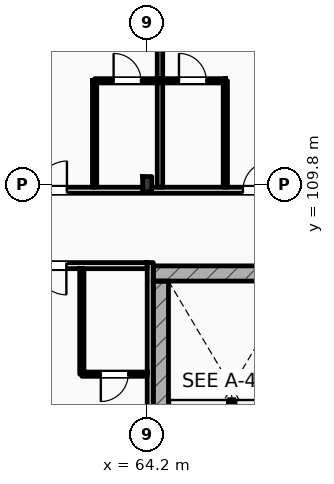
"""IFC4 building model, lengths in metres.
Left out: names, types, materials, properties, quantities, classifications, styles, units other than length and angle.
Written with IfcOpenShell. Run it as: python <this file> out.ifc"""

import sys

from ifc_helpers import new_model, si_unit, direction, frame, frame_2d, origin, origin_2d, place, context, subcontext, project, spatial, rectangle, i_section, extrude, element, fill, save


model = new_model("IFC4")
c1 = context("Model", 3, precision=1e-05, world=origin(), true_north=direction((0.0, 1.0)))
c2 = subcontext(c1, "Body", "Model", "MODEL_VIEW")
j1 = project(units=[si_unit("LENGTHUNIT", "METRE"), si_unit("PLANEANGLEUNIT", "RADIAN")], contexts=[c1])
p1 = place(None, origin())
s1 = spatial("IfcSite", under=j1, at=p1, CompositionType="ELEMENT")
p2 = place(p1, origin())
s2 = spatial("IfcBuilding", under=s1, at=p2, CompositionType="ELEMENT")
p3 = place(p2, frame((0.0, 0.0, 31.8)))
s3 = spatial("IfcBuildingStorey", under=s2, at=p3, CompositionType="ELEMENT", Elevation=31.8)
p4 = place(p3, frame((64.2, 109.8, 0.0), z_axis=(0.0, 0.0, 1.0), x_axis=(1.0, 0.0, 0.0)))
e1 = element("IfcColumn", 1, at=p4, inside=s3, PredefinedType="COLUMN", context=c2, shape_type="SweptSolid", body=[
    extrude(i_section(OverallWidth=0.3, OverallDepth=0.5, WebThickness=0.014, FlangeThickness=0.028, FilletRadius=0.027, at=origin_2d()), origin(), (0.0, 0.0, 1.0), 3.6),
])
p5 = place(p3, frame((64.4, 106.862, 0.0), z_axis=(0.0, 0.0, 1.0), x_axis=(1.0, 0.0, 0.0)))
e2 = element("IfcWall", 2, at=p5, inside=s3, PredefinedType="SHEAR", context=c2, shape_type="SweptSolid", body=[
    extrude(rectangle(XDim=5.16, YDim=0.5, at=frame_2d((2.58, 0.0))), origin(), (0.0, 0.0, 1.0), 3.6),
])
p6 = place(p3, frame((64.65, 97.5, 0.0), z_axis=(0.0, 0.0, 1.0), x_axis=(0.0, 1.0, 0.0)))
e3 = element("IfcWall", 3, at=p6, inside=s3, PredefinedType="SHEAR", context=c2, shape_type="SweptSolid", body=[
    extrude(rectangle(XDim=9.112, YDim=0.5, at=frame_2d((4.556, 0.0))), origin(), (0.0, 0.0, 1.0), 3.6),
])
p7 = place(p3, frame((10.65, 109.6, 0.0), z_axis=(0.0, 0.0, 1.0), x_axis=(1.0, 0.0, 0.0)))
e4 = element("IfcWall", 4, at=p7, inside=s3, PredefinedType="PARTITIONING", context=c2, shape_type="SweptSolid", body=[
    extrude(rectangle(XDim=109.21, YDim=0.2, at=frame_2d((54.605, 0.0))), origin(), (0.0, 0.0, 1.0), 2.72),
])
p8 = place(p7, frame((15.825, 0.0, 0.0)))
e5 = element("IfcOpeningElement", 5, at=p8, cuts=e4, PredefinedType="OPENING", context=c2, shape_type="SweptSolid", body=[
    extrude(rectangle(XDim=1.02, YDim=2.2, at=frame_2d((0.51, 1.1))), frame((0.0, 0.11, 0.0), z_axis=(0.0, -1.0, 0.0), x_axis=(1.0, 0.0, 0.0)), (0.0, 0.0, 1.0), 0.22),
])
p9 = place(p7, frame((19.87, 0.0, 0.0)))
e6 = element("IfcOpeningElement", 6, at=p9, cuts=e4, PredefinedType="OPENING", context=c2, shape_type="SweptSolid", body=[
    extrude(rectangle(XDim=1.02, YDim=2.2, at=frame_2d((0.51, 1.1))), frame((0.0, 0.11, 0.0), z_axis=(0.0, -1.0, 0.0), x_axis=(1.0, 0.0, 0.0)), (0.0, 0.0, 1.0), 0.22),
])
p10 = place(p7, frame((24.47, 0.0, 0.0)))
e7 = element("IfcOpeningElement", 7, at=p10, cuts=e4, PredefinedType="OPENING", context=c2, shape_type="SweptSolid", body=[
    extrude(rectangle(XDim=1.02, YDim=2.2, at=frame_2d((0.51, 1.1))), frame((0.0, 0.11, 0.0), z_axis=(0.0, -1.0, 0.0), x_axis=(1.0, 0.0, 0.0)), (0.0, 0.0, 1.0), 0.22),
])
p11 = place(p7, frame((26.92, 0.0, 0.0)))
e8 = element("IfcOpeningElement", 8, at=p11, cuts=e4, PredefinedType="OPENING", context=c2, shape_type="SweptSolid", body=[
    extrude(rectangle(XDim=1.02, YDim=2.2, at=frame_2d((0.51, 1.1))), frame((0.0, 0.11, 0.0), z_axis=(0.0, -1.0, 0.0), x_axis=(1.0, 0.0, 0.0)), (0.0, 0.0, 1.0), 0.22),
])
p12 = place(p7, frame((33.7, 0.0, 0.0)))
e9 = element("IfcOpeningElement", 9, at=p12, cuts=e4, PredefinedType="OPENING", context=c2, shape_type="SweptSolid", body=[
    extrude(rectangle(XDim=0.96, YDim=2.2, at=frame_2d((0.48, 1.1))), frame((0.0, 0.11, 0.0), z_axis=(0.0, -1.0, 0.0), x_axis=(1.0, 0.0, 0.0)), (0.0, 0.0, 1.0), 0.22),
])
p13 = place(p7, frame((35.9, 0.0, 0.0)))
e10 = element("IfcOpeningElement", 10, at=p13, cuts=e4, PredefinedType="OPENING", context=c2, shape_type="SweptSolid", body=[
    extrude(rectangle(XDim=0.96, YDim=2.2, at=frame_2d((0.48, 1.1))), frame((0.0, 0.11, 0.0), z_axis=(0.0, -1.0, 0.0), x_axis=(1.0, 0.0, 0.0)), (0.0, 0.0, 1.0), 0.22),
])
p14 = place(p7, frame((42.9, 0.0, 0.0)))
e11 = element("IfcOpeningElement", 11, at=p14, cuts=e4, PredefinedType="OPENING", context=c2, shape_type="SweptSolid", body=[
    extrude(rectangle(XDim=0.96, YDim=2.2, at=frame_2d((0.48, 1.1))), frame((0.0, 0.11, 0.0), z_axis=(0.0, -1.0, 0.0), x_axis=(1.0, 0.0, 0.0)), (0.0, 0.0, 1.0), 0.22),
])
p15 = place(p7, frame((47.5, 0.0, 0.0)))
e12 = element("IfcOpeningElement", 12, at=p15, cuts=e4, PredefinedType="OPENING", context=c2, shape_type="SweptSolid", body=[
    extrude(rectangle(XDim=0.96, YDim=2.2, at=frame_2d((0.48, 1.1))), frame((0.0, 0.11, 0.0), z_axis=(0.0, -1.0, 0.0), x_axis=(1.0, 0.0, 0.0)), (0.0, 0.0, 1.0), 0.22),
])
p16 = place(p7, frame((49.95, 0.0, 0.0)))
e13 = element("IfcOpeningElement", 13, at=p16, cuts=e4, PredefinedType="OPENING", context=c2, shape_type="SweptSolid", body=[
    extrude(rectangle(XDim=0.96, YDim=2.2, at=frame_2d((0.48, 1.1))), frame((0.0, 0.11, 0.0), z_axis=(0.0, -1.0, 0.0), x_axis=(1.0, 0.0, 0.0)), (0.0, 0.0, 1.0), 0.22),
])
p17 = place(p7, frame((56.7, 0.0, 0.0)))
e14 = element("IfcOpeningElement", 14, at=p17, cuts=e4, PredefinedType="OPENING", context=c2, shape_type="SweptSolid", body=[
    extrude(rectangle(XDim=0.96, YDim=2.2, at=frame_2d((0.48, 1.1))), frame((0.0, 0.11, 0.0), z_axis=(0.0, -1.0, 0.0), x_axis=(1.0, 0.0, 0.0)), (0.0, 0.0, 1.0), 0.22),
])
p18 = place(p7, frame((59.15, 0.0, 0.0)))
e15 = element("IfcOpeningElement", 15, at=p18, cuts=e4, PredefinedType="OPENING", context=c2, shape_type="SweptSolid", body=[
    extrude(rectangle(XDim=0.96, YDim=2.2, at=frame_2d((0.48, 1.1))), frame((0.0, 0.11, 0.0), z_axis=(0.0, -1.0, 0.0), x_axis=(1.0, 0.0, 0.0)), (0.0, 0.0, 1.0), 0.22),
])
p19 = place(p7, frame((65.9, 0.0, 0.0)))
e16 = element("IfcOpeningElement", 16, at=p19, cuts=e4, PredefinedType="OPENING", context=c2, shape_type="SweptSolid", body=[
    extrude(rectangle(XDim=0.96, YDim=2.2, at=frame_2d((0.48, 1.1))), frame((0.0, 0.11, 0.0), z_axis=(0.0, -1.0, 0.0), x_axis=(1.0, 0.0, 0.0)), (0.0, 0.0, 1.0), 0.22),
])
p20 = place(p7, frame((70.5, 0.0, 0.0)))
e17 = element("IfcOpeningElement", 17, at=p20, cuts=e4, PredefinedType="OPENING", context=c2, shape_type="SweptSolid", body=[
    extrude(rectangle(XDim=0.96, YDim=2.2, at=frame_2d((0.48, 1.1))), frame((0.0, 0.11, 0.0), z_axis=(0.0, -1.0, 0.0), x_axis=(1.0, 0.0, 0.0)), (0.0, 0.0, 1.0), 0.22),
])
p21 = place(p7, frame((72.95, 0.0, 0.0)))
e18 = element("IfcOpeningElement", 18, at=p21, cuts=e4, PredefinedType="OPENING", context=c2, shape_type="SweptSolid", body=[
    extrude(rectangle(XDim=0.96, YDim=2.2, at=frame_2d((0.48, 1.1))), frame((0.0, 0.11, 0.0), z_axis=(0.0, -1.0, 0.0), x_axis=(1.0, 0.0, 0.0)), (0.0, 0.0, 1.0), 0.22),
])
p22 = place(p7, frame((79.7, 0.0, 0.0)))
e19 = element("IfcOpeningElement", 19, at=p22, cuts=e4, PredefinedType="OPENING", context=c2, shape_type="SweptSolid", body=[
    extrude(rectangle(XDim=0.96, YDim=2.2, at=frame_2d((0.48, 1.1))), frame((0.0, 0.11, 0.0), z_axis=(0.0, -1.0, 0.0), x_axis=(1.0, 0.0, 0.0)), (0.0, 0.0, 1.0), 0.22),
])
p23 = place(p7, frame((82.15, 0.0, 0.0)))
e20 = element("IfcOpeningElement", 20, at=p23, cuts=e4, PredefinedType="OPENING", context=c2, shape_type="SweptSolid", body=[
    extrude(rectangle(XDim=0.96, YDim=2.2, at=frame_2d((0.48, 1.1))), frame((0.0, 0.11, 0.0), z_axis=(0.0, -1.0, 0.0), x_axis=(1.0, 0.0, 0.0)), (0.0, 0.0, 1.0), 0.22),
])
p24 = place(p7, frame((88.9, 0.0, 0.0)))
e21 = element("IfcOpeningElement", 21, at=p24, cuts=e4, PredefinedType="OPENING", context=c2, shape_type="SweptSolid", body=[
    extrude(rectangle(XDim=0.96, YDim=2.2, at=frame_2d((0.48, 1.1))), frame((0.0, 0.11, 0.0), z_axis=(0.0, -1.0, 0.0), x_axis=(1.0, 0.0, 0.0)), (0.0, 0.0, 1.0), 0.22),
])
p25 = place(p7, frame((93.75, 0.0, 0.0)))
e22 = element("IfcOpeningElement", 22, at=p25, cuts=e4, PredefinedType="OPENING", context=c2, shape_type="SweptSolid", body=[
    extrude(rectangle(XDim=0.96, YDim=2.2, at=frame_2d((0.48, 1.1))), frame((0.0, 0.11, 0.0), z_axis=(0.0, -1.0, 0.0), x_axis=(1.0, 0.0, 0.0)), (0.0, 0.0, 1.0), 0.22),
])
p26 = place(p7, frame((98.1, 0.0, 0.0)))
e23 = element("IfcOpeningElement", 23, at=p26, cuts=e4, PredefinedType="OPENING", context=c2, shape_type="SweptSolid", body=[
    extrude(rectangle(XDim=0.96, YDim=2.2, at=frame_2d((0.48, 1.1))), frame((0.0, 0.11, 0.0), z_axis=(0.0, -1.0, 0.0), x_axis=(1.0, 0.0, 0.0)), (0.0, 0.0, 1.0), 0.22),
])
p27 = place(p7, frame((102.7, 0.0, 0.0)))
e24 = element("IfcOpeningElement", 24, at=p27, cuts=e4, PredefinedType="OPENING", context=c2, shape_type="SweptSolid", body=[
    extrude(rectangle(XDim=0.96, YDim=2.2, at=frame_2d((0.48, 1.1))), frame((0.0, 0.11, 0.0), z_axis=(0.0, -1.0, 0.0), x_axis=(1.0, 0.0, 0.0)), (0.0, 0.0, 1.0), 0.22),
])
p28 = place(p7, frame((105.04, 0.0, 0.0)))
e25 = element("IfcOpeningElement", 25, at=p28, cuts=e4, PredefinedType="OPENING", context=c2, shape_type="SweptSolid", body=[
    extrude(rectangle(XDim=0.96, YDim=2.2, at=frame_2d((0.48, 1.1))), frame((0.0, 0.11, 0.0), z_axis=(0.0, -1.0, 0.0), x_axis=(1.0, 0.0, 0.0)), (0.0, 0.0, 1.0), 0.22),
])
p29 = place(p7, frame((2.716, 0.0, 0.0)))
e26 = element("IfcOpeningElement", 26, at=p29, cuts=e4, PredefinedType="OPENING", context=c2, shape_type="SweptSolid", body=[
    extrude(rectangle(XDim=1.35, YDim=2.25, at=frame_2d((0.675, 1.125))), frame((0.0, 0.11, 0.0), z_axis=(0.0, -1.0, 0.0), x_axis=(1.0, 0.0, 0.0)), (0.0, 0.0, 1.0), 0.22),
])
p30 = place(p7, frame((6.65, 0.0, 0.0)))
e27 = element("IfcOpeningElement", 27, at=p30, cuts=e4, PredefinedType="OPENING", context=c2, shape_type="SweptSolid", body=[
    extrude(rectangle(XDim=1.35, YDim=2.25, at=frame_2d((0.675, 1.125))), frame((0.0, 0.11, 0.0), z_axis=(0.0, -1.0, 0.0), x_axis=(1.0, 0.0, 0.0)), (0.0, 0.0, 1.0), 0.22),
])
p31 = place(p7, frame((10.583, 0.0, 0.0)))
e28 = element("IfcOpeningElement", 28, at=p31, cuts=e4, PredefinedType="OPENING", context=c2, shape_type="SweptSolid", body=[
    extrude(rectangle(XDim=1.35, YDim=2.25, at=frame_2d((0.675, 1.125))), frame((0.0, 0.11, 0.0), z_axis=(0.0, -1.0, 0.0), x_axis=(1.0, 0.0, 0.0)), (0.0, 0.0, 1.0), 0.22),
])
p32 = place(p3, frame((40.76, 107.12, 0.0), z_axis=(0.0, 0.0, 1.0), x_axis=(1.0, 0.0, 0.0)))
e29 = element("IfcWall", 29, at=p32, inside=s3, PredefinedType="PARTITIONING", context=c2, shape_type="SweptSolid", body=[
    extrude(rectangle(XDim=23.44, YDim=0.2, at=frame_2d((11.72, 0.0))), origin(), (0.0, 0.0, 1.0), 3.36),
])
p33 = place(p32, frame((2.429, 0.0, 0.0)))
e30 = element("IfcOpeningElement", 30, at=p33, cuts=e29, PredefinedType="OPENING", context=c2, shape_type="SweptSolid", body=[
    extrude(rectangle(XDim=0.96, YDim=2.2, at=frame_2d((0.48, 1.1))), frame((0.0, 0.11, 0.0), z_axis=(0.0, -1.0, 0.0), x_axis=(1.0, 0.0, 0.0)), (0.0, 0.0, 1.0), 0.22),
])
p34 = place(p32, frame((4.243, 0.0, 0.0)))
e31 = element("IfcOpeningElement", 31, at=p34, cuts=e29, PredefinedType="OPENING", context=c2, shape_type="SweptSolid", body=[
    extrude(rectangle(XDim=0.96, YDim=2.2, at=frame_2d((0.48, 1.1))), frame((0.0, 0.11, 0.0), z_axis=(0.0, -1.0, 0.0), x_axis=(1.0, 0.0, 0.0)), (0.0, 0.0, 1.0), 0.22),
])
p35 = place(p32, frame((10.301, 0.0, 0.0)))
e32 = element("IfcOpeningElement", 32, at=p35, cuts=e29, PredefinedType="OPENING", context=c2, shape_type="SweptSolid", body=[
    extrude(rectangle(XDim=0.96, YDim=2.2, at=frame_2d((0.48, 1.1))), frame((0.0, 0.11, 0.0), z_axis=(0.0, -1.0, 0.0), x_axis=(1.0, 0.0, 0.0)), (0.0, 0.0, 1.0), 0.22),
])
p36 = place(p32, frame((12.059, 0.0, 0.0)))
e33 = element("IfcOpeningElement", 33, at=p36, cuts=e29, PredefinedType="OPENING", context=c2, shape_type="SweptSolid", body=[
    extrude(rectangle(XDim=0.96, YDim=2.2, at=frame_2d((0.48, 1.1))), frame((0.0, 0.11, 0.0), z_axis=(0.0, -1.0, 0.0), x_axis=(1.0, 0.0, 0.0)), (0.0, 0.0, 1.0), 0.22),
])
p37 = place(p32, frame((18.118, 0.0, 0.0)))
e34 = element("IfcOpeningElement", 34, at=p37, cuts=e29, PredefinedType="OPENING", context=c2, shape_type="SweptSolid", body=[
    extrude(rectangle(XDim=0.96, YDim=2.2, at=frame_2d((0.48, 1.1))), frame((0.0, 0.11, 0.0), z_axis=(0.0, -1.0, 0.0), x_axis=(1.0, 0.0, 0.0)), (0.0, 0.0, 1.0), 0.22),
])
p38 = place(p32, frame((19.821, 0.0, 0.0)))
e35 = element("IfcOpeningElement", 35, at=p38, cuts=e29, PredefinedType="OPENING", context=c2, shape_type="SweptSolid", body=[
    extrude(rectangle(XDim=0.96, YDim=2.2, at=frame_2d((0.48, 1.1))), frame((0.0, 0.11, 0.0), z_axis=(0.0, -1.0, 0.0), x_axis=(1.0, 0.0, 0.0)), (0.0, 0.0, 1.0), 0.22),
])
p39 = place(p3, frame((64.3, 96.14, 0.0), z_axis=(0.0, 0.0, 1.0), x_axis=(0.0, 1.0, 0.0)))
e36 = element("IfcWall", 36, at=p39, inside=s3, PredefinedType="PARTITIONING", context=c2, shape_type="SweptSolid", body=[
    extrude(rectangle(XDim=11.08, YDim=0.2, at=frame_2d((5.54, 0.0))), origin(), (0.0, 0.0, 1.0), 2.99),
])
p40 = place(p3, frame((64.62, 109.7, 0.0), z_axis=(0.0, 0.0, 1.0), x_axis=(0.0, 1.0, 0.0)))
e37 = element("IfcWall", 37, at=p40, inside=s3, PredefinedType="PARTITIONING", context=c2, shape_type="SweptSolid", body=[
    extrude(rectangle(XDim=8.15, YDim=0.18, at=frame_2d((4.075, 0.0))), origin(), (0.0, 0.0, 1.0), 3.36),
])
p41 = place(p3, frame((62.47, 109.7, 0.0), z_axis=(0.0, 0.0, 1.0), x_axis=(0.0, 1.0, 0.0)))
e38 = element("IfcWall", 38, at=p41, inside=s3, PredefinedType="PARTITIONING", context=c2, shape_type="SweptSolid", body=[
    extrude(rectangle(XDim=3.5, YDim=0.14, at=frame_2d((1.75, 0.0))), origin(), (0.0, 0.0, 1.0), 3.36),
])
p42 = place(p3, frame((62.47, 113.2, 0.0), z_axis=(0.0, 0.0, 1.0), x_axis=(1.0, 0.0, 0.0)))
e39 = element("IfcWall", 39, at=p42, inside=s3, PredefinedType="PARTITIONING", context=c2, shape_type="SweptSolid", body=[
    extrude(rectangle(XDim=2.15, YDim=0.14, at=frame_2d((1.075, 0.0))), origin(), (0.0, 0.0, 1.0), 3.36),
])
p43 = place(p42, frame((0.625, 0.0, 0.0)))
e40 = element("IfcOpeningElement", 40, at=p43, cuts=e39, PredefinedType="OPENING", context=c2, shape_type="SweptSolid", body=[
    extrude(rectangle(XDim=0.9, YDim=2.1, at=frame_2d((0.45, 1.05))), frame((0.0, 0.08, 0.0), z_axis=(0.0, -1.0, 0.0), x_axis=(1.0, 0.0, 0.0)), (0.0, 0.0, 1.0), 0.16),
])
p44 = place(p3, frame((66.77, 109.7, 0.0), z_axis=(0.0, 0.0, 1.0), x_axis=(0.0, 1.0, 0.0)))
e41 = element("IfcWall", 41, at=p44, inside=s3, PredefinedType="PARTITIONING", context=c2, shape_type="SweptSolid", body=[
    extrude(rectangle(XDim=3.5, YDim=0.14, at=frame_2d((1.75, 0.0))), origin(), (0.0, 0.0, 1.0), 3.05),
])
p45 = place(p3, frame((64.62, 113.2, 0.0), z_axis=(0.0, 0.0, 1.0), x_axis=(1.0, 0.0, 0.0)))
e42 = element("IfcWall", 42, at=p45, inside=s3, PredefinedType="PARTITIONING", context=c2, shape_type="SweptSolid", body=[
    extrude(rectangle(XDim=2.15, YDim=0.14, at=frame_2d((1.075, 0.0))), origin(), (0.0, 0.0, 1.0), 3.36),
])
p46 = place(p45, frame((0.625, 0.0, 0.0)))
e43 = element("IfcOpeningElement", 43, at=p46, cuts=e42, PredefinedType="OPENING", context=c2, shape_type="SweptSolid", body=[
    extrude(rectangle(XDim=0.9, YDim=2.1, at=frame_2d((0.45, 1.05))), frame((0.0, 0.08, 0.0), z_axis=(0.0, -1.0, 0.0), x_axis=(1.0, 0.0, 0.0)), (0.0, 0.0, 1.0), 0.16),
])
p47 = place(p3, frame((62.05, 103.55, 0.0), z_axis=(0.0, 0.0, 1.0), x_axis=(0.0, 1.0, 0.0)))
e44 = element("IfcWall", 44, at=p47, inside=s3, PredefinedType="PARTITIONING", context=c2, shape_type="SweptSolid", body=[
    extrude(rectangle(XDim=3.47, YDim=0.14, at=frame_2d((1.735, 0.0))), origin(), (0.0, 0.0, 1.0), 3.36),
])
p48 = place(p3, frame((62.05, 103.55, 0.0), z_axis=(0.0, 0.0, 1.0), x_axis=(1.0, 0.0, 0.0)))
e45 = element("IfcWall", 45, at=p48, inside=s3, PredefinedType="PARTITIONING", context=c2, shape_type="SweptSolid", body=[
    extrude(rectangle(XDim=2.15, YDim=0.14, at=frame_2d((1.075, 0.0))), origin(), (0.0, 0.0, 1.0), 3.36),
])
p49 = place(p48, frame((0.625, 0.0, 0.0)))
e46 = element("IfcOpeningElement", 46, at=p49, cuts=e45, PredefinedType="OPENING", context=c2, shape_type="SweptSolid", body=[
    extrude(rectangle(XDim=0.9, YDim=2.1, at=frame_2d((0.45, 1.05))), frame((0.0, 0.08, 0.0), z_axis=(0.0, -1.0, 0.0), x_axis=(1.0, 0.0, 0.0)), (0.0, 0.0, 1.0), 0.16),
])
p50 = place(p16, origin())
e47 = element("IfcDoor", 47, at=p50, inside=s3, OperationType="SINGLE_SWING_RIGHT", PredefinedType="DOOR", context=c2, shape_type="SweptSolid", body=[
    extrude(rectangle(XDim=0.96, YDim=2.2, at=frame_2d((0.48, 1.1))), frame((0.0, 0.025, 0.0), z_axis=(0.0, -1.0, 0.0), x_axis=(1.0, 0.0, 0.0)), (0.0, 0.0, 1.0), 0.05),
])
fill(e13, e47)
p51 = place(p43, origin())
e48 = element("IfcDoor", 48, at=p51, inside=s3, OperationType="SINGLE_SWING_LEFT", PredefinedType="DOOR", context=c2, shape_type="SweptSolid", body=[
    extrude(rectangle(XDim=0.9, YDim=2.1, at=frame_2d((0.45, 1.05))), frame((0.0, 0.025, 0.0), z_axis=(0.0, -1.0, 0.0), x_axis=(1.0, 0.0, 0.0)), (0.0, 0.0, 1.0), 0.05),
])
fill(e40, e48)
p52 = place(p17, origin())
e49 = element("IfcDoor", 49, at=p52, inside=s3, OperationType="SINGLE_SWING_RIGHT", PredefinedType="DOOR", context=c2, shape_type="SweptSolid", body=[
    extrude(rectangle(XDim=0.96, YDim=2.2, at=frame_2d((0.48, 1.1))), frame((0.0, 0.025, 0.0), z_axis=(0.0, -1.0, 0.0), x_axis=(1.0, 0.0, 0.0)), (0.0, 0.0, 1.0), 0.05),
])
fill(e14, e49)
p53 = place(p46, origin())
e50 = element("IfcDoor", 50, at=p53, inside=s3, OperationType="SINGLE_SWING_LEFT", PredefinedType="DOOR", context=c2, shape_type="SweptSolid", body=[
    extrude(rectangle(XDim=0.9, YDim=2.1, at=frame_2d((0.45, 1.05))), frame((0.0, 0.025, 0.0), z_axis=(0.0, -1.0, 0.0), x_axis=(1.0, 0.0, 0.0)), (0.0, 0.0, 1.0), 0.05),
])
fill(e43, e50)
p54 = place(p38, frame((0.96, 0.0, 0.0), z_axis=(0.0, 0.0, 1.0), x_axis=(-1.0, 0.0, 0.0)))
e51 = element("IfcDoor", 51, at=p54, inside=s3, OperationType="SINGLE_SWING_RIGHT", PredefinedType="DOOR", context=c2, shape_type="SweptSolid", body=[
    extrude(rectangle(XDim=0.96, YDim=2.2, at=frame_2d((0.48, 1.1))), frame((0.0, 0.025, 0.0), z_axis=(0.0, -1.0, 0.0), x_axis=(1.0, 0.0, 0.0)), (0.0, 0.0, 1.0), 0.05),
])
fill(e35, e51)
p55 = place(p49, frame((0.9, 0.0, 0.0), z_axis=(0.0, 0.0, 1.0), x_axis=(-1.0, 0.0, 0.0)))
e52 = element("IfcDoor", 52, at=p55, inside=s3, OperationType="SINGLE_SWING_LEFT", PredefinedType="DOOR", context=c2, shape_type="SweptSolid", body=[
    extrude(rectangle(XDim=0.9, YDim=2.1, at=frame_2d((0.45, 1.05))), frame((0.0, 0.025, 0.0), z_axis=(0.0, -1.0, 0.0), x_axis=(1.0, 0.0, 0.0)), (0.0, 0.0, 1.0), 0.05),
])
fill(e46, e52)
save(model, sys.argv[1])
